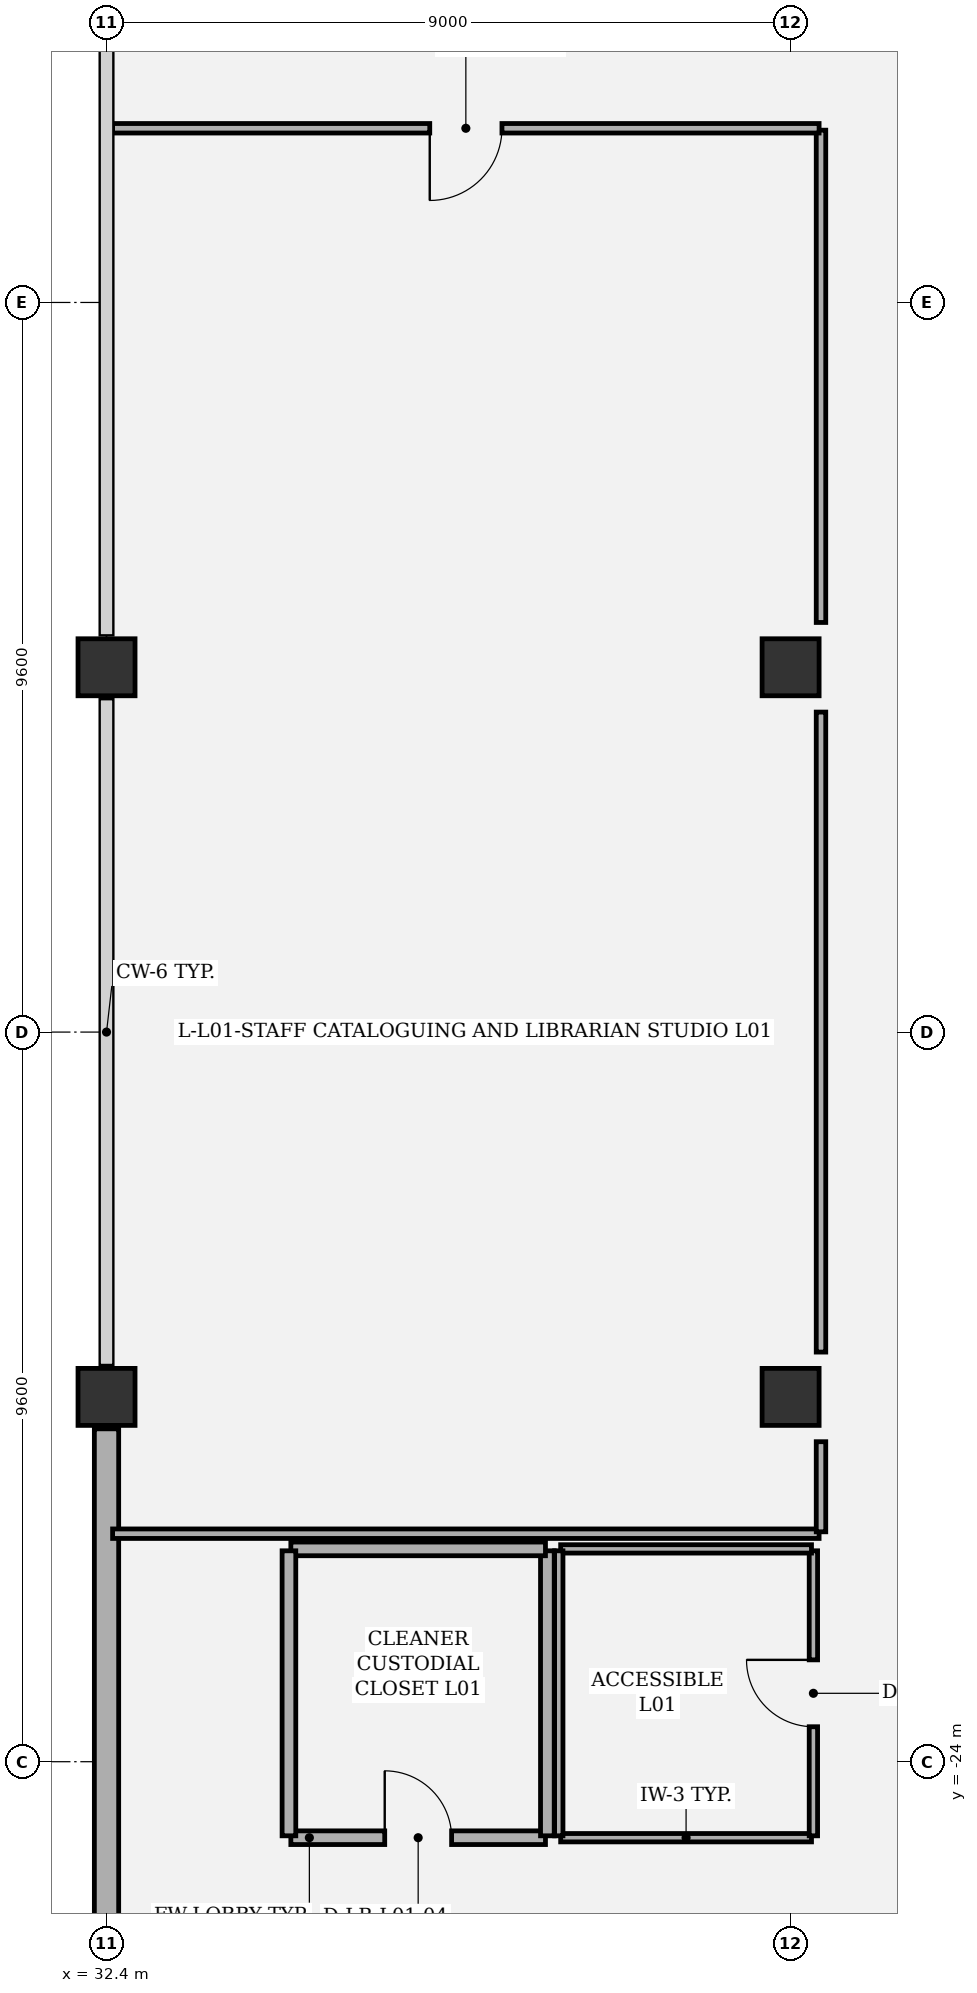
"""IFC4 building model, lengths in metres.
Left out: names, types, materials, properties, quantities, classifications, styles, units other than length and angle.
Written with IfcOpenShell. Run it as: python <this file> out.ifc"""

import sys

from ifc_helpers import new_model, si_unit, direction, frame, frame_2d, origin, origin_2d, place, context, subcontext, project, spatial, rectangle, extrude, element, fill, save


model = new_model("IFC4")
c1 = context("Model", 3, precision=1e-05, world=origin(), true_north=direction((0.0, 1.0)))
c2 = subcontext(c1, "Body", "Model", "MODEL_VIEW")
j1 = project(units=[si_unit("LENGTHUNIT", "METRE"), si_unit("PLANEANGLEUNIT", "RADIAN")], contexts=[c1])
p1 = place(None, origin())
s1 = spatial("IfcSite", under=j1, at=p1, CompositionType="ELEMENT")
p2 = place(p1, origin())
s2 = spatial("IfcBuilding", under=s1, at=p2, CompositionType="ELEMENT")
p3 = place(p2, frame((0.0, 0.0, 6.6)))
s3 = spatial("IfcBuildingStorey", under=s2, at=p3, CompositionType="ELEMENT", Elevation=6.6)
for number, where, z_axis, x_axis in (
    (1, (32.4, -19.2, 0.0), (0.0, 0.0, 1.0), (1.0, 0.0, 0.0)),
    (2, (32.4, -9.6, 0.0), (0.0, 0.0, 1.0), (1.0, 0.0, 0.0)),
    (3, (41.4, -19.2, 0.0), (0.0, 0.0, 1.0), (1.0, 0.0, 0.0)),
    (4, (41.4, -9.6, 0.0), (0.0, 0.0, 1.0), (1.0, 0.0, 0.0)),
):
    element("IfcColumn", number, at=place(p3, frame(where, z_axis=z_axis, x_axis=x_axis)), inside=s3, PredefinedType="COLUMN", context=c2, shape_type="SweptSolid", body=[
        extrude(rectangle(XDim=0.75, YDim=0.75, at=origin_2d()), origin(), (0.0, 0.0, 1.0), 5.4),
    ])
p4 = place(p3, frame((32.4, -28.38, 0.0), z_axis=(0.0, 0.0, 1.0), x_axis=(0.0, 1.0, 0.0)))
e5 = element("IfcWall", 5, at=p4, inside=s3, PredefinedType="SOLIDWALL", context=c2, shape_type="SweptSolid", body=[
    extrude(rectangle(XDim=8.76, YDim=0.32, at=frame_2d((4.38, 0.0))), origin(), (0.0, 0.0, 1.0), 4.337),
])
p5 = place(p3, frame((38.375, -25.0, 0.0), z_axis=(0.0, 0.0, 1.0), x_axis=(1.0, 0.0, 0.0)))
e6 = element("IfcWall", 6, at=p5, inside=s3, PredefinedType="PARTITIONING", context=c2, shape_type="SweptSolid", body=[
    extrude(rectangle(XDim=3.3, YDim=0.11, at=frame_2d((1.65, 0.0))), origin(), (0.0, 0.0, 1.0), 5.14),
])
p6 = place(p3, frame((41.7, -24.975, 0.0), z_axis=(0.0, 0.0, 1.0), x_axis=(0.0, 1.0, 0.0)))
e7 = element("IfcWall", 7, at=p6, inside=s3, PredefinedType="PARTITIONING", context=c2, shape_type="SweptSolid", body=[
    extrude(rectangle(XDim=3.75, YDim=0.11, at=frame_2d((1.875, 0.0))), origin(), (0.0, 0.0, 1.0), 4.494),
])
p7 = place(p6, frame((1.435, 0.0, 0.0)))
e8 = element("IfcOpeningElement", 8, at=p7, cuts=e7, PredefinedType="OPENING", context=c2, shape_type="SweptSolid", body=[
    extrude(rectangle(XDim=0.88, YDim=2.1, at=frame_2d((0.44, 1.05))), frame((0.0, 0.065, 0.0), z_axis=(0.0, -1.0, 0.0), x_axis=(1.0, 0.0, 0.0)), (0.0, 0.0, 1.0), 0.13),
])
p8 = place(p3, frame((41.675, -21.2, 0.0), z_axis=(0.0, 0.0, 1.0), x_axis=(-1.0, 0.0, 0.0)))
e9 = element("IfcWall", 9, at=p8, inside=s3, PredefinedType="PARTITIONING", context=c2, shape_type="SweptSolid", body=[
    extrude(rectangle(XDim=3.3, YDim=0.11, at=frame_2d((1.65, 0.0))), origin(), (0.0, 0.0, 1.0), 5.14),
])
p9 = place(p3, frame((38.35, -21.225, 0.0), z_axis=(0.0, 0.0, 1.0), x_axis=(0.0, -1.0, 0.0)))
e10 = element("IfcWall", 10, at=p9, inside=s3, PredefinedType="PARTITIONING", context=c2, shape_type="SweptSolid", body=[
    extrude(rectangle(XDim=3.75, YDim=0.11, at=frame_2d((1.875, 0.0))), origin(), (0.0, 0.0, 1.0), 5.14),
])
p10 = place(p3, frame((34.825, -25.0, 0.0), z_axis=(0.0, 0.0, 1.0), x_axis=(1.0, 0.0, 0.0)))
e11 = element("IfcWall", 11, at=p10, inside=s3, PredefinedType="PARTITIONING", context=c2, shape_type="SweptSolid", body=[
    extrude(rectangle(XDim=3.35, YDim=0.18, at=frame_2d((1.675, 0.0))), origin(), (0.0, 0.0, 1.0), 5.14),
])
p11 = place(p10, frame((1.235, 0.0, 0.0)))
e12 = element("IfcOpeningElement", 12, at=p11, cuts=e11, PredefinedType="OPENING", context=c2, shape_type="SweptSolid", body=[
    extrude(rectangle(XDim=0.88, YDim=2.1, at=frame_2d((0.44, 1.05))), frame((0.0, 0.1, 0.0), z_axis=(0.0, -1.0, 0.0), x_axis=(1.0, 0.0, 0.0)), (0.0, 0.0, 1.0), 0.2),
])
p12 = place(p3, frame((38.2, -24.975, 0.0), z_axis=(0.0, 0.0, 1.0), x_axis=(0.0, 1.0, 0.0)))
e13 = element("IfcWall", 13, at=p12, inside=s3, PredefinedType="PARTITIONING", context=c2, shape_type="SweptSolid", body=[
    extrude(rectangle(XDim=3.75, YDim=0.18, at=frame_2d((1.875, 0.0))), origin(), (0.0, 0.0, 1.0), 5.14),
])
p13 = place(p3, frame((38.175, -21.2, 0.0), z_axis=(0.0, 0.0, 1.0), x_axis=(-1.0, 0.0, 0.0)))
e14 = element("IfcWall", 14, at=p13, inside=s3, PredefinedType="PARTITIONING", context=c2, shape_type="SweptSolid", body=[
    extrude(rectangle(XDim=3.35, YDim=0.18, at=frame_2d((1.675, 0.0))), origin(), (0.0, 0.0, 1.0), 5.14),
])
p14 = place(p3, frame((34.8, -21.225, 0.0), z_axis=(0.0, 0.0, 1.0), x_axis=(0.0, -1.0, 0.0)))
e15 = element("IfcWall", 15, at=p14, inside=s3, PredefinedType="PARTITIONING", context=c2, shape_type="SweptSolid", body=[
    extrude(rectangle(XDim=3.75, YDim=0.18, at=frame_2d((1.875, 0.0))), origin(), (0.0, 0.0, 1.0), 5.14),
])
p15 = place(p3, frame((32.48, -21.0, 0.0), z_axis=(0.0, 0.0, 1.0), x_axis=(1.0, 0.0, 0.0)))
e16 = element("IfcWall", 16, at=p15, inside=s3, PredefinedType="PARTITIONING", context=c2, shape_type="SweptSolid", body=[
    extrude(rectangle(XDim=9.295, YDim=0.125, at=frame_2d((4.647, 0.0))), origin(), (0.0, 0.0, 1.0), 5.14),
])
p16 = place(p3, frame((41.8, -20.975, 0.0), z_axis=(0.0, 0.0, 1.0), x_axis=(0.0, 1.0, 0.0)))
e17 = element("IfcWall", 17, at=p16, inside=s3, PredefinedType="PARTITIONING", context=c2, shape_type="SweptSolid", body=[
    extrude(rectangle(XDim=1.186, YDim=0.125, at=frame_2d((0.593, 0.0))), origin(), (0.0, 0.0, 1.0), 5.14),
])
p17 = place(p3, frame((41.8, -18.61, 0.0), z_axis=(0.0, 0.0, 1.0), x_axis=(0.0, 1.0, 0.0)))
e18 = element("IfcWall", 18, at=p17, inside=s3, PredefinedType="PARTITIONING", context=c2, shape_type="SweptSolid", body=[
    extrude(rectangle(XDim=8.421, YDim=0.125, at=frame_2d((4.21, 0.0))), origin(), (0.0, 0.0, 1.0), 5.14),
])
p18 = place(p3, frame((41.8, -9.01, 0.0), z_axis=(0.0, 0.0, 1.0), x_axis=(0.0, 1.0, 0.0)))
e19 = element("IfcWall", 19, at=p18, inside=s3, PredefinedType="PARTITIONING", context=c2, shape_type="SweptSolid", body=[
    extrude(rectangle(XDim=6.477, YDim=0.125, at=frame_2d((3.239, 0.0))), origin(), (0.0, 0.0, 1.0), 5.14),
])
p19 = place(p3, frame((41.775, -2.508, 0.0), z_axis=(0.0, 0.0, 1.0), x_axis=(-1.0, 0.0, 0.0)))
e20 = element("IfcWall", 20, at=p19, inside=s3, PredefinedType="PARTITIONING", context=c2, shape_type="SweptSolid", body=[
    extrude(rectangle(XDim=9.295, YDim=0.125, at=frame_2d((4.647, 0.0))), origin(), (0.0, 0.0, 1.0), 4.653),
])
p20 = place(p19, frame((4.172, 0.0, 0.0)))
e21 = element("IfcOpeningElement", 21, at=p20, cuts=e20, PredefinedType="OPENING", context=c2, shape_type="SweptSolid", body=[
    extrude(rectangle(XDim=0.95, YDim=2.15, at=frame_2d((0.475, 1.075))), frame((0.0, 0.073, 0.0), z_axis=(0.0, -1.0, 0.0), x_axis=(1.0, 0.0, 0.0)), (0.0, 0.0, 1.0), 0.145),
])
p21 = place(p7, origin())
e22 = element("IfcDoor", 22, at=p21, inside=s3, OperationType="SINGLE_SWING_RIGHT", PredefinedType="DOOR", context=c2, shape_type="SweptSolid", body=[
    extrude(rectangle(XDim=0.88, YDim=2.1, at=frame_2d((0.44, 1.05))), frame((0.0, 0.025, 0.0), z_axis=(0.0, -1.0, 0.0), x_axis=(1.0, 0.0, 0.0)), (0.0, 0.0, 1.0), 0.05),
])
fill(e8, e22)
p22 = place(p11, origin())
e23 = element("IfcDoor", 23, at=p22, inside=s3, OperationType="SINGLE_SWING_LEFT", PredefinedType="DOOR", context=c2, shape_type="SweptSolid", body=[
    extrude(rectangle(XDim=0.88, YDim=2.1, at=frame_2d((0.44, 1.05))), frame((0.0, 0.025, 0.0), z_axis=(0.0, -1.0, 0.0), x_axis=(1.0, 0.0, 0.0)), (0.0, 0.0, 1.0), 0.05),
])
fill(e12, e23)
p23 = place(p20, origin())
e24 = element("IfcDoor", 24, at=p23, inside=s3, OperationType="SINGLE_SWING_RIGHT", PredefinedType="DOOR", context=c2, shape_type="SweptSolid", body=[
    extrude(rectangle(XDim=0.95, YDim=2.15, at=frame_2d((0.475, 1.075))), frame((0.0, 0.025, 0.0), z_axis=(0.0, -1.0, 0.0), x_axis=(1.0, 0.0, 0.0)), (0.0, 0.0, 1.0), 0.05),
])
fill(e21, e24)
save(model, sys.argv[1])
